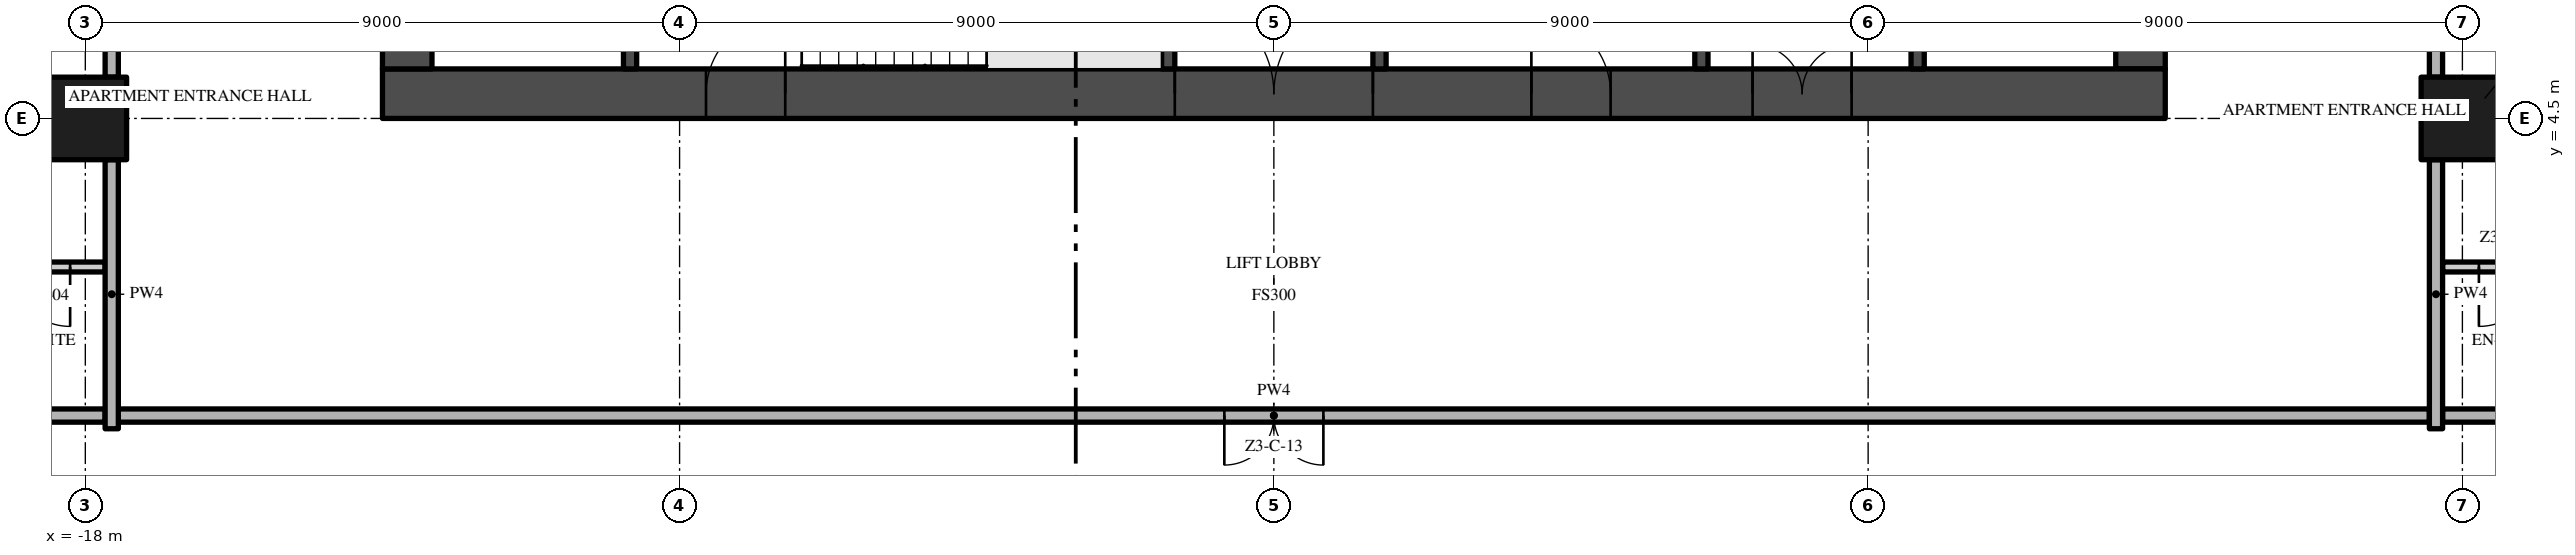
"""IFC4 building model, lengths in metres.
Left out: names, types, materials, properties, quantities, classifications, styles, units other than length and angle.
Written with IfcOpenShell. Run it as: python <this file> out.ifc"""

import sys

from ifc_helpers import new_model, si_unit, direction, frame, frame_2d, origin, origin_2d, place, context, subcontext, project, spatial, rectangle, extrude, element, fill, save


model = new_model("IFC4")
c1 = context("Model", 3, precision=1e-05, world=origin(), true_north=direction((0.0, 1.0)))
c2 = subcontext(c1, "Body", "Model", "MODEL_VIEW")
j1 = project(units=[si_unit("LENGTHUNIT", "METRE"), si_unit("PLANEANGLEUNIT", "RADIAN")], contexts=[c1])
p1 = place(None, origin())
s1 = spatial("IfcSite", under=j1, at=p1, CompositionType="ELEMENT")
p2 = place(p1, origin())
s2 = spatial("IfcBuilding", under=s1, at=p2, CompositionType="ELEMENT")
p3 = place(p2, frame((0.0, 0.0, 151.6)))
s3 = spatial("IfcBuildingStorey", under=s2, at=p3, CompositionType="ELEMENT", Elevation=151.6)
p4 = place(p3, frame((-13.5, 4.875, -0.3), z_axis=(0.0, 0.0, 1.0), x_axis=(1.0, 0.0, 0.0)))
e1 = element("IfcWall", 1, at=p4, inside=s3, PredefinedType="SHEAR", context=c2, shape_type="SweptSolid", body=[
    extrude(rectangle(XDim=27.0, YDim=0.75, at=frame_2d((13.5, 0.0))), origin(), (0.0, 0.0, 1.0), 3.8),
])
p5 = place(p4, frame((12.0, 0.0, 0.3)))
e2 = element("IfcOpeningElement", 2, at=p5, cuts=e1, PredefinedType="OPENING", context=c2, shape_type="SweptSolid", body=[
    extrude(rectangle(XDim=3.0, YDim=2.4, at=frame_2d((1.5, 1.2))), frame((0.0, 0.385, 0.0), z_axis=(0.0, -1.0, 0.0), x_axis=(1.0, 0.0, 0.0)), (0.0, 0.0, 1.0), 0.77),
])
p6 = place(p4, frame((4.9, 0.0, 0.3)))
e3 = element("IfcOpeningElement", 3, at=p6, cuts=e1, PredefinedType="OPENING", context=c2, shape_type="SweptSolid", body=[
    extrude(rectangle(XDim=1.2, YDim=2.2, at=frame_2d((0.6, 1.1))), frame((0.0, 0.385, 0.0), z_axis=(0.0, -1.0, 0.0), x_axis=(1.0, 0.0, 0.0)), (0.0, 0.0, 1.0), 0.77),
])
p7 = place(p4, frame((20.75, 0.0, 0.3)))
e4 = element("IfcOpeningElement", 4, at=p7, cuts=e1, PredefinedType="OPENING", context=c2, shape_type="SweptSolid", body=[
    extrude(rectangle(XDim=1.5, YDim=2.2, at=frame_2d((0.75, 1.1))), frame((0.0, 0.385, 0.0), z_axis=(0.0, -1.0, 0.0), x_axis=(1.0, 0.0, 0.0)), (0.0, 0.0, 1.0), 0.77),
])
p8 = place(p4, frame((17.4, 0.0, 0.3)))
e5 = element("IfcOpeningElement", 5, at=p8, cuts=e1, PredefinedType="OPENING", context=c2, shape_type="SweptSolid", body=[
    extrude(rectangle(XDim=1.2, YDim=2.2, at=frame_2d((0.6, 1.1))), frame((0.0, 0.385, 0.0), z_axis=(0.0, -1.0, 0.0), x_axis=(1.0, 0.0, 0.0)), (0.0, 0.0, 1.0), 0.77),
])
p9 = place(p3, frame((13.125, 5.25, -0.3), z_axis=(0.0, 0.0, 1.0), x_axis=(0.0, 1.0, 0.0)))
e6 = element("IfcWall", 6, at=p9, inside=s3, PredefinedType="SHEAR", context=c2, shape_type="SweptSolid", body=[
    extrude(rectangle(XDim=16.5, YDim=0.75, at=frame_2d((8.25, 0.0))), origin(), (0.0, 0.0, 1.0), 3.8),
])
p10 = place(p9, frame((6.15, 0.0, 0.3)))
e7 = element("IfcOpeningElement", 7, at=p10, cuts=e6, PredefinedType="OPENING", context=c2, shape_type="SweptSolid", body=[
    extrude(rectangle(XDim=1.2, YDim=2.2, at=frame_2d((0.6, 1.1))), frame((0.0, 0.385, 0.0), z_axis=(0.0, -1.0, 0.0), x_axis=(1.0, 0.0, 0.0)), (0.0, 0.0, 1.0), 0.77),
])
p11 = place(p3, frame((-13.125, 21.75, -0.3), z_axis=(0.0, 0.0, 1.0), x_axis=(0.0, -1.0, 0.0)))
e8 = element("IfcWall", 8, at=p11, inside=s3, PredefinedType="SHEAR", context=c2, shape_type="SweptSolid", body=[
    extrude(rectangle(XDim=16.5, YDim=0.75, at=frame_2d((8.25, 0.0))), origin(), (0.0, 0.0, 1.0), 3.8),
])
p12 = place(p11, frame((9.15, 0.0, 0.3)))
e9 = element("IfcOpeningElement", 9, at=p12, cuts=e8, PredefinedType="OPENING", context=c2, shape_type="SweptSolid", body=[
    extrude(rectangle(XDim=1.2, YDim=2.2, at=frame_2d((0.6, 1.1))), frame((0.0, 0.385, 0.0), z_axis=(0.0, -1.0, 0.0), x_axis=(1.0, 0.0, 0.0)), (0.0, 0.0, 1.0), 0.77),
])
for number, where, z_axis, x_axis in (
    (10, (-18.0, 4.5, 0.0), (0.0, 0.0, 1.0), (1.0, 0.0, 0.0)),
    (11, (18.0, 4.5, 0.0), (0.0, 0.0, 1.0), (1.0, 0.0, 0.0)),
):
    element("IfcColumn", number, at=place(p3, frame(where, z_axis=z_axis, x_axis=x_axis)), inside=s3, PredefinedType="COLUMN", context=c2, shape_type="SweptSolid", body=[
        extrude(rectangle(XDim=1.25, YDim=1.25, at=origin_2d()), origin(), (0.0, 0.0, 1.0), 3.5),
    ])
for number, where, z_axis, x_axis in (
    (12, (-9.75, 5.25, 0.0), (0.0, 0.0, 1.0), (0.0, 1.0, 0.0)),
    (13, (-1.6, 5.25, 0.0), (0.0, 0.0, 1.0), (0.0, 1.0, 0.0)),
):
    element("IfcWall", number, at=place(p3, frame(where, z_axis=z_axis, x_axis=x_axis)), inside=s3, PredefinedType="SHEAR", context=c2, shape_type="SweptSolid", body=[
        extrude(rectangle(XDim=2.7, YDim=0.2, at=frame_2d((1.35, 0.0))), origin(), (0.0, 0.0, 1.0), 3.5),
    ])
p13 = place(p3, frame((1.6, 11.5, 0.0), z_axis=(0.0, 0.0, 1.0), x_axis=(0.0, -1.0, 0.0)))
e14 = element("IfcWall", 14, at=p13, inside=s3, PredefinedType="SHEAR", context=c2, shape_type="SweptSolid", body=[
    extrude(rectangle(XDim=6.25, YDim=0.2, at=frame_2d((3.125, 0.0))), origin(), (0.0, 0.0, 1.0), 3.5),
])
p14 = place(p13, frame((2.275, 0.0, 0.0)))
e15 = element("IfcOpeningElement", 15, at=p14, cuts=e14, PredefinedType="OPENING", context=c2, shape_type="SweptSolid", body=[
    extrude(rectangle(XDim=0.9, YDim=2.1, at=frame_2d((0.45, 1.05))), frame((0.0, 0.11, 0.0), z_axis=(0.0, -1.0, 0.0), x_axis=(1.0, 0.0, 0.0)), (0.0, 0.0, 1.0), 0.22),
])
p15 = place(p3, frame((6.475, 5.25, 0.0), z_axis=(0.0, 0.0, 1.0), x_axis=(0.0, 1.0, 0.0)))
e16 = element("IfcWall", 16, at=p15, inside=s3, PredefinedType="SHEAR", context=c2, shape_type="SweptSolid", body=[
    extrude(rectangle(XDim=6.25, YDim=0.2, at=frame_2d((3.125, 0.0))), origin(), (0.0, 0.0, 1.0), 3.5),
])
p16 = place(p3, frame((9.75, 5.25, 0.0), z_axis=(0.0, 0.0, 1.0), x_axis=(0.0, 1.0, 0.0)))
e17 = element("IfcWall", 17, at=p16, inside=s3, PredefinedType="SHEAR", context=c2, shape_type="SweptSolid", body=[
    extrude(rectangle(XDim=2.35, YDim=0.2, at=frame_2d((1.175, 0.0))), origin(), (0.0, 0.0, 1.0), 3.5),
])
p17 = place(p16, frame((0.7, 0.0, 0.0)))
e18 = element("IfcOpeningElement", 18, at=p17, cuts=e17, PredefinedType="OPENING", context=c2, shape_type="SweptSolid", body=[
    extrude(rectangle(XDim=1.1, YDim=2.1, at=frame_2d((0.55, 1.05))), frame((0.0, 0.11, 0.0), z_axis=(0.0, -1.0, 0.0), x_axis=(1.0, 0.0, 0.0)), (0.0, 0.0, 1.0), 0.22),
])
p18 = place(p3, frame((17.5, 0.0, 0.0), z_axis=(0.0, 0.0, 1.0), x_axis=(-1.0, 0.0, 0.0)))
e19 = element("IfcWall", 19, at=p18, inside=s3, PredefinedType="PARTITIONING", context=c2, shape_type="SweptSolid", body=[
    extrude(rectangle(XDim=35.0, YDim=0.2, at=frame_2d((17.5, 0.0))), origin(), (0.0, 0.0, 1.0), 3.5),
])
p19 = place(p18, frame((16.75, 0.0, 0.0)))
e20 = element("IfcOpeningElement", 20, at=p19, cuts=e19, PredefinedType="OPENING", context=c2, shape_type="SweptSolid", body=[
    extrude(rectangle(XDim=1.5, YDim=2.4, at=frame_2d((0.75, 1.2))), frame((0.0, 0.11, 0.0), z_axis=(0.0, -1.0, 0.0), x_axis=(1.0, 0.0, 0.0)), (0.0, 0.0, 1.0), 0.22),
])
for number, where, z_axis, x_axis in (
    (21, (-22.2, 0.0, 0.0), (0.0, 0.0, 1.0), (1.0, 0.0, 0.0)),
    (22, (17.7, 0.0, 0.0), (0.0, 0.0, 1.0), (1.0, 0.0, 0.0)),
):
    element("IfcWall", number, at=place(p3, frame(where, z_axis=z_axis, x_axis=x_axis)), inside=s3, PredefinedType="PARTITIONING", context=c2, shape_type="SweptSolid", body=[
        extrude(rectangle(XDim=4.5, YDim=0.2, at=frame_2d((2.25, 0.0))), origin(), (0.0, 0.0, 1.0), 3.5),
    ])
p20 = place(p3, frame((-17.7, 2.25, 0.0), z_axis=(0.0, 0.0, 1.0), x_axis=(-1.0, 0.0, 0.0)))
e23 = element("IfcWall", 23, at=p20, inside=s3, PredefinedType="PARTITIONING", context=c2, shape_type="SweptSolid", body=[
    extrude(rectangle(XDim=2.03, YDim=0.15, at=frame_2d((1.015, 0.0))), origin(), (0.0, 0.0, 1.0), 3.5),
])
p21 = place(p20, frame((0.53, 0.0, 0.0)))
e24 = element("IfcOpeningElement", 24, at=p21, cuts=e23, PredefinedType="OPENING", context=c2, shape_type="SweptSolid", body=[
    extrude(rectangle(XDim=0.9, YDim=2.1, at=frame_2d((0.45, 1.05))), frame((0.0, 0.085, 0.0), z_axis=(0.0, -1.0, 0.0), x_axis=(1.0, 0.0, 0.0)), (0.0, 0.0, 1.0), 0.17),
])
p22 = place(p3, frame((19.73, 2.25, 0.0), z_axis=(0.0, 0.0, 1.0), x_axis=(-1.0, 0.0, 0.0)))
e25 = element("IfcWall", 25, at=p22, inside=s3, PredefinedType="PARTITIONING", context=c2, shape_type="SweptSolid", body=[
    extrude(rectangle(XDim=2.03, YDim=0.15, at=frame_2d((1.015, 0.0))), origin(), (0.0, 0.0, 1.0), 3.5),
])
p23 = place(p22, frame((0.58, 0.0, 0.0)))
e26 = element("IfcOpeningElement", 26, at=p23, cuts=e25, PredefinedType="OPENING", context=c2, shape_type="SweptSolid", body=[
    extrude(rectangle(XDim=0.9, YDim=2.1, at=frame_2d((0.45, 1.05))), frame((0.0, 0.085, 0.0), z_axis=(0.0, -1.0, 0.0), x_axis=(1.0, 0.0, 0.0)), (0.0, 0.0, 1.0), 0.17),
])
p24 = place(p3, frame((-17.6, -0.2, 0.0), z_axis=(0.0, 0.0, 1.0), x_axis=(0.0, 1.0, 0.0)))
e27 = element("IfcWall", 27, at=p24, inside=s3, PredefinedType="PARTITIONING", context=c2, shape_type="SweptSolid", body=[
    extrude(rectangle(XDim=4.075, YDim=0.2, at=frame_2d((2.038, 0.0))), origin(), (0.0, 0.0, 1.0), 3.5),
])
p25 = place(p3, frame((-17.6, 5.125, 0.0), z_axis=(0.0, 0.0, 1.0), x_axis=(0.0, 1.0, 0.0)))
e28 = element("IfcWall", 28, at=p25, inside=s3, PredefinedType="PARTITIONING", context=c2, shape_type="SweptSolid", body=[
    extrude(rectangle(XDim=7.75, YDim=0.2, at=frame_2d((3.875, 0.0))), origin(), (0.0, 0.0, 1.0), 3.5),
])
p26 = place(p25, frame((1.0, 0.0, 0.0)))
e29 = element("IfcOpeningElement", 29, at=p26, cuts=e28, PredefinedType="OPENING", context=c2, shape_type="SweptSolid", body=[
    extrude(rectangle(XDim=1.2, YDim=2.4, at=frame_2d((0.6, 1.2))), frame((0.0, 0.11, 0.0), z_axis=(0.0, -1.0, 0.0), x_axis=(1.0, 0.0, 0.0)), (0.0, 0.0, 1.0), 0.22),
])
p27 = place(p3, frame((17.6, -0.2, 0.0), z_axis=(0.0, 0.0, 1.0), x_axis=(0.0, 1.0, 0.0)))
e30 = element("IfcWall", 30, at=p27, inside=s3, PredefinedType="PARTITIONING", context=c2, shape_type="SweptSolid", body=[
    extrude(rectangle(XDim=4.075, YDim=0.2, at=frame_2d((2.038, 0.0))), origin(), (0.0, 0.0, 1.0), 3.5),
])
p28 = place(p3, frame((17.6, 12.875, 0.0), z_axis=(0.0, 0.0, 1.0), x_axis=(0.0, -1.0, 0.0)))
e31 = element("IfcWall", 31, at=p28, inside=s3, PredefinedType="PARTITIONING", context=c2, shape_type="SweptSolid", body=[
    extrude(rectangle(XDim=7.75, YDim=0.2, at=frame_2d((3.875, 0.0))), origin(), (0.0, 0.0, 1.0), 3.5),
])
p29 = place(p28, frame((5.55, 0.0, 0.0)))
e32 = element("IfcOpeningElement", 32, at=p29, cuts=e31, PredefinedType="OPENING", context=c2, shape_type="SweptSolid", body=[
    extrude(rectangle(XDim=1.2, YDim=2.4, at=frame_2d((0.6, 1.2))), frame((0.0, 0.11, 0.0), z_axis=(0.0, -1.0, 0.0), x_axis=(1.0, 0.0, 0.0)), (0.0, 0.0, 1.0), 0.22),
])
p30 = place(p5, frame((3.0, 0.0, 0.0), z_axis=(0.0, 0.0, 1.0), x_axis=(-1.0, 0.0, 0.0)))
e33 = element("IfcDoor", 33, at=p30, inside=s3, OperationType="DOUBLE_DOOR_SINGLE_SWING", PredefinedType="DOOR", context=c2, shape_type="SweptSolid", body=[
    extrude(rectangle(XDim=3.0, YDim=2.4, at=frame_2d((1.5, 1.2))), frame((0.0, 0.025, 0.0), z_axis=(0.0, -1.0, 0.0), x_axis=(1.0, 0.0, 0.0)), (0.0, 0.0, 1.0), 0.05),
])
fill(e2, e33)
p31 = place(p6, frame((1.2, 0.0, 0.0), z_axis=(0.0, 0.0, 1.0), x_axis=(-1.0, 0.0, 0.0)))
e34 = element("IfcDoor", 34, at=p31, inside=s3, OperationType="SINGLE_SWING_LEFT", PredefinedType="DOOR", context=c2, shape_type="SweptSolid", body=[
    extrude(rectangle(XDim=1.2, YDim=2.2, at=frame_2d((0.6, 1.1))), frame((0.0, 0.025, 0.0), z_axis=(0.0, -1.0, 0.0), x_axis=(1.0, 0.0, 0.0)), (0.0, 0.0, 1.0), 0.05),
])
fill(e3, e34)
p32 = place(p7, frame((1.5, 0.0, 0.0), z_axis=(0.0, 0.0, 1.0), x_axis=(-1.0, 0.0, 0.0)))
e35 = element("IfcDoor", 35, at=p32, inside=s3, OperationType="DOUBLE_DOOR_SINGLE_SWING", PredefinedType="DOOR", context=c2, shape_type="SweptSolid", body=[
    extrude(rectangle(XDim=1.5, YDim=2.2, at=frame_2d((0.75, 1.1))), frame((0.0, 0.025, 0.0), z_axis=(0.0, -1.0, 0.0), x_axis=(1.0, 0.0, 0.0)), (0.0, 0.0, 1.0), 0.05),
])
fill(e4, e35)
p33 = place(p8, frame((1.2, 0.0, 0.0), z_axis=(0.0, 0.0, 1.0), x_axis=(-1.0, 0.0, 0.0)))
e36 = element("IfcDoor", 36, at=p33, inside=s3, OperationType="SINGLE_SWING_RIGHT", PredefinedType="DOOR", context=c2, shape_type="SweptSolid", body=[
    extrude(rectangle(XDim=1.2, YDim=2.2, at=frame_2d((0.6, 1.1))), frame((0.0, 0.025, 0.0), z_axis=(0.0, -1.0, 0.0), x_axis=(1.0, 0.0, 0.0)), (0.0, 0.0, 1.0), 0.05),
])
fill(e5, e36)
p34 = place(p21, origin())
e37 = element("IfcDoor", 37, at=p34, inside=s3, OperationType="SINGLE_SWING_LEFT", PredefinedType="DOOR", context=c2, shape_type="SweptSolid", body=[
    extrude(rectangle(XDim=0.9, YDim=2.1, at=frame_2d((0.45, 1.05))), frame((0.0, 0.025, 0.0), z_axis=(0.0, -1.0, 0.0), x_axis=(1.0, 0.0, 0.0)), (0.0, 0.0, 1.0), 0.05),
])
fill(e24, e37)
p35 = place(p23, origin())
e38 = element("IfcDoor", 38, at=p35, inside=s3, OperationType="SINGLE_SWING_RIGHT", PredefinedType="DOOR", context=c2, shape_type="SweptSolid", body=[
    extrude(rectangle(XDim=0.9, YDim=2.1, at=frame_2d((0.45, 1.05))), frame((0.0, 0.025, 0.0), z_axis=(0.0, -1.0, 0.0), x_axis=(1.0, 0.0, 0.0)), (0.0, 0.0, 1.0), 0.05),
])
fill(e26, e38)
p36 = place(p19, origin())
e39 = element("IfcDoor", 39, at=p36, inside=s3, OperationType="DOUBLE_DOOR_SINGLE_SWING", PredefinedType="DOOR", context=c2, shape_type="SweptSolid", body=[
    extrude(rectangle(XDim=1.5, YDim=2.4, at=frame_2d((0.75, 1.2))), frame((0.0, 0.025, 0.0), z_axis=(0.0, -1.0, 0.0), x_axis=(1.0, 0.0, 0.0)), (0.0, 0.0, 1.0), 0.05),
])
fill(e20, e39)
save(model, sys.argv[1])
